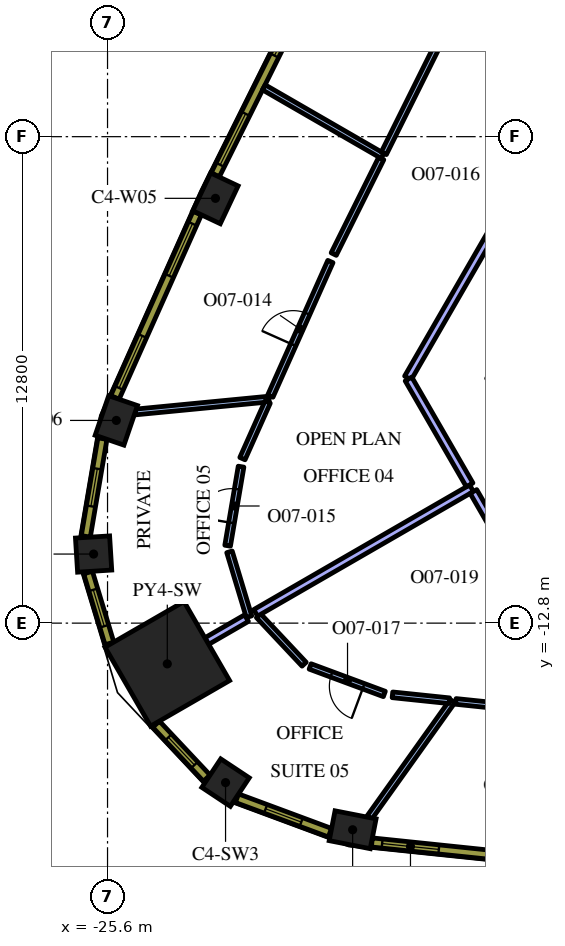
"""IFC4 building model, lengths in metres.
Left out: names, types, materials, properties, quantities, classifications, styles, units other than length and angle.
Written with IfcOpenShell. Run it as: python <this file> out.ifc"""

import sys

from ifc_helpers import new_model, si_unit, direction, frame, frame_2d, origin, origin_2d, place, context, subcontext, project, spatial, rectangle, extrude, element, fill, save


model = new_model("IFC4")
c1 = context("Model", 3, precision=1e-05, world=origin(), true_north=direction((0.0, 1.0)))
c2 = subcontext(c1, "Body", "Model", "MODEL_VIEW")
j1 = project(units=[si_unit("LENGTHUNIT", "METRE"), si_unit("PLANEANGLEUNIT", "RADIAN")], contexts=[c1])
p1 = place(None, origin())
s1 = spatial("IfcSite", under=j1, at=p1, CompositionType="ELEMENT")
p2 = place(p1, origin())
s2 = spatial("IfcBuilding", under=s1, at=p2, CompositionType="ELEMENT")
p3 = place(p2, frame((0.0, 0.0, 214.2)))
s3 = spatial("IfcBuildingStorey", under=s2, at=p3, CompositionType="ELEMENT", Elevation=214.2)
p4 = place(p3, frame((-24.027, -13.872, 0.0), z_axis=(0.0, 0.0, 1.0), x_axis=(-0.866025403784, -0.5, 0.0)))
e1 = element("IfcColumn", 1, at=p4, inside=s3, PredefinedType="COLUMN", context=c2, shape_type="SweptSolid", body=[
    extrude(rectangle(XDim=2.4, YDim=2.4, at=origin_2d()), origin(), (0.0, 0.0, 1.0), 4.2),
])
for number, where, z_axis, x_axis in (
    (2, (-19.15, -18.237, 0.0), (0.0, 0.0, 1.0), (0.981, -0.192, 0.0)),
    (3, (-22.76, -1.623, 0.0), (0.0, 0.0, 1.0), (-0.426, -0.905, 0.0)),
    (4, (-25.369, -7.466, 0.0), (0.0, 0.0, 1.0), (-0.324, -0.946, 0.0)),
):
    element("IfcColumn", number, at=place(p3, frame(where, z_axis=z_axis, x_axis=x_axis)), inside=s3, PredefinedType="COLUMN", context=c2, shape_type="SweptSolid", body=[
        extrude(rectangle(XDim=1.1, YDim=0.8, at=origin_2d()), origin(), (0.0, 0.0, 1.0), 4.2),
    ])
for number, where, z_axis, x_axis in (
    (5, (-25.967, -10.982, 0.0), (0.0, 0.0, 1.0), (0.062, -0.998, 0.0)),
    (6, (-22.494, -16.997, 0.0), (0.0, 0.0, 1.0), (0.833, -0.553, 0.0)),
):
    element("IfcColumn", number, at=place(p3, frame(where, z_axis=z_axis, x_axis=x_axis)), inside=s3, PredefinedType="COLUMN", context=c2, shape_type="SweptSolid", body=[
        extrude(rectangle(XDim=0.9, YDim=0.9, at=origin_2d()), origin(), (0.0, 0.0, 1.0), 4.2),
    ])
p5 = place(p3, frame((-18.363, -0.506, 0.0), z_axis=(0.0, 0.0, 1.0), x_axis=(-0.866048087663, 0.499960708312, 0.0)))
e7 = element("IfcWall", 7, at=p5, inside=s3, PredefinedType="PARTITIONING", context=c2, shape_type="SweptSolid", body=[
    extrude(rectangle(XDim=3.607, YDim=0.15, at=frame_2d((1.804, 0.0))), origin(), (0.0, 0.0, 1.0), 3.45),
])
p6 = place(p3, frame((-16.958, 2.321, 0.0), z_axis=(0.0, 0.0, 1.0), x_axis=(-0.445184199442, -0.895439014432, 0.0)))
e8 = element("IfcWall", 8, at=p6, inside=s3, PredefinedType="PARTITIONING", context=c2, shape_type="SweptSolid", body=[
    extrude(rectangle(XDim=3.082, YDim=0.15, at=frame_2d((1.541, 0.0))), origin(), (0.0, 0.0, 1.0), 3.45),
])
p7 = place(p3, frame((-21.351, -6.904, 0.0), z_axis=(0.0, 0.0, 1.0), x_axis=(-0.995356631468, -0.096255785242, 0.0)))
e9 = element("IfcWall", 9, at=p7, inside=s3, PredefinedType="PARTITIONING", context=c2, shape_type="SweptSolid", body=[
    extrude(rectangle(XDim=3.536, YDim=0.15, at=frame_2d((1.768, 0.0))), origin(), (0.0, 0.0, 1.0), 3.45),
])
p8 = place(p3, frame((-18.397, -0.573, 0.0), z_axis=(0.0, 0.0, 1.0), x_axis=(-0.445162501923, -0.89544980143, 0.0)))
e10 = element("IfcWall", 10, at=p8, inside=s3, PredefinedType="PARTITIONING", context=c2, shape_type="SweptSolid", body=[
    extrude(rectangle(XDim=2.811, YDim=0.15, at=frame_2d((1.405, 0.0))), origin(), (0.0, 0.0, 1.0), 3.45),
])
p9 = place(p3, frame((-21.316, -6.826, 0.0), z_axis=(0.0, 0.0, 1.0), x_axis=(0.407639588163, 0.913142905663, 0.0)))
e11 = element("IfcWall", 11, at=p9, inside=s3, PredefinedType="PARTITIONING", context=c2, shape_type="SweptSolid", body=[
    extrude(rectangle(XDim=3.877, YDim=0.15, at=frame_2d((1.938, 0.0))), origin(), (0.0, 0.0, 1.0), 3.45),
])
p10 = place(p9, frame((1.477, 0.0, 0.0)))
e12 = element("IfcOpeningElement", 12, at=p10, cuts=e11, PredefinedType="OPENING", context=c2, shape_type="SweptSolid", body=[
    extrude(rectangle(XDim=0.9, YDim=2.1, at=frame_2d((0.45, 1.05))), frame((0.0, 0.085, 0.0), z_axis=(0.0, -1.0, 0.0), x_axis=(1.0, 0.0, 0.0)), (0.0, 0.0, 1.0), 0.17),
])
p11 = place(p3, frame((-21.386, -6.983, 0.0), z_axis=(0.0, 0.0, 1.0), x_axis=(-0.407597309494, -0.91316177827, 0.0)))
e13 = element("IfcWall", 13, at=p11, inside=s3, PredefinedType="PARTITIONING", context=c2, shape_type="SweptSolid", body=[
    extrude(rectangle(XDim=1.63, YDim=0.15, at=frame_2d((0.815, 0.0))), origin(), (0.0, 0.0, 1.0), 3.45),
])
p12 = place(p3, frame((-22.44, -10.763, 0.0), z_axis=(0.0, 0.0, 1.0), x_axis=(0.167682096872, 0.985841120257, 0.0)))
e14 = element("IfcWall", 14, at=p12, inside=s3, PredefinedType="PARTITIONING", context=c2, shape_type="SweptSolid", body=[
    extrude(rectangle(XDim=2.11, YDim=0.15, at=frame_2d((1.055, 0.0))), origin(), (0.0, 0.0, 1.0), 3.45),
])
p13 = place(p12, frame((0.61, 0.0, 0.0)))
e15 = element("IfcOpeningElement", 15, at=p13, cuts=e14, PredefinedType="OPENING", context=c2, shape_type="SweptSolid", body=[
    extrude(rectangle(XDim=0.9, YDim=2.1, at=frame_2d((0.45, 1.05))), frame((0.0, 0.085, 0.0), z_axis=(0.0, -1.0, 0.0), x_axis=(1.0, 0.0, 0.0)), (0.0, 0.0, 1.0), 0.17),
])
p14 = place(p3, frame((-22.391, -10.924, 0.0), z_axis=(0.0, 0.0, 1.0), x_axis=(0.288642134652, -0.957437056993, 0.0)))
e16 = element("IfcWall", 16, at=p14, inside=s3, PredefinedType="PARTITIONING", context=c2, shape_type="SweptSolid", body=[
    extrude(rectangle(XDim=1.782, YDim=0.15, at=frame_2d((0.891, 0.0))), origin(), (0.0, 0.0, 1.0), 3.45),
])
p15 = place(p3, frame((-21.943, -12.669, 0.0), z_axis=(0.0, 0.0, 1.0), x_axis=(-0.866030586491, -0.499991023182, 0.0)))
e17 = element("IfcWall", 17, at=p15, inside=s3, PredefinedType="PARTITIONING", context=c2, shape_type="SweptSolid", body=[
    extrude(rectangle(XDim=1.207, YDim=0.2, at=frame_2d((0.603, 0.0))), origin(), (0.0, 0.0, 1.0), 3.45),
])
p16 = place(p3, frame((-16.021, -9.25, 0.0), z_axis=(0.0, 0.0, 1.0), x_axis=(-0.866021955858, -0.500005971936, 0.0)))
e18 = element("IfcWall", 18, at=p16, inside=s3, PredefinedType="PARTITIONING", context=c2, shape_type="SweptSolid", body=[
    extrude(rectangle(XDim=6.56, YDim=0.2, at=frame_2d((3.28, 0.0))), origin(), (0.0, 0.0, 1.0), 3.45),
])
p17 = place(p3, frame((-12.537, 2.585, 0.0), z_axis=(0.0, 0.0, 1.0), x_axis=(-0.500002393198, -0.866024022066, 0.0)))
e19 = element("IfcWall", 19, at=p17, inside=s3, PredefinedType="PARTITIONING", context=c2, shape_type="SweptSolid", body=[
    extrude(rectangle(XDim=10.317, YDim=0.2, at=frame_2d((5.159, 0.0))), origin(), (0.0, 0.0, 1.0), 3.45),
])
p18 = place(p17, frame((4.7, 0.0, 0.0)))
e20 = element("IfcOpeningElement", 20, at=p18, cuts=e19, PredefinedType="OPENING", context=c2, shape_type="SweptSolid", body=[
    extrude(rectangle(XDim=1.0, YDim=2.1, at=frame_2d((0.5, 1.05))), frame((0.0, 0.11, 0.0), z_axis=(0.0, -1.0, 0.0), x_axis=(1.0, 0.0, 0.0)), (0.0, 0.0, 1.0), 0.22),
])
p19 = place(p3, frame((-17.681, -6.376, 0.0), z_axis=(0.0, 0.0, 1.0), x_axis=(0.500022299258, -0.866012528919, 0.0)))
e21 = element("IfcWall", 21, at=p19, inside=s3, PredefinedType="PARTITIONING", context=c2, shape_type="SweptSolid", body=[
    extrude(rectangle(XDim=3.219, YDim=0.2, at=frame_2d((1.609, 0.0))), origin(), (0.0, 0.0, 1.0), 3.45),
])
p20 = place(p3, frame((-16.521, -14.851, 0.0), z_axis=(0.0, 0.0, 1.0), x_axis=(-0.58104805465, -0.813869251285, 0.0)))
e22 = element("IfcWall", 22, at=p20, inside=s3, PredefinedType="PARTITIONING", context=c2, shape_type="SweptSolid", body=[
    extrude(rectangle(XDim=3.766, YDim=0.15, at=frame_2d((1.883, 0.0))), origin(), (0.0, 0.0, 1.0), 3.45),
])
p21 = place(p3, frame((-21.628, -12.603, 0.0), z_axis=(0.0, 0.0, 1.0), x_axis=(0.684778496912, -0.728751267695, 0.0)))
e23 = element("IfcWall", 23, at=p21, inside=s3, PredefinedType="PARTITIONING", context=c2, shape_type="SweptSolid", body=[
    extrude(rectangle(XDim=1.754, YDim=0.15, at=frame_2d((0.877, 0.0))), origin(), (0.0, 0.0, 1.0), 3.45),
])
p22 = place(p3, frame((-18.316, -14.664, 0.0), z_axis=(0.0, 0.0, 1.0), x_axis=(-0.937594570401, 0.347730386297, 0.0)))
e24 = element("IfcWall", 24, at=p22, inside=s3, PredefinedType="PARTITIONING", context=c2, shape_type="SweptSolid", body=[
    extrude(rectangle(XDim=2.083, YDim=0.15, at=frame_2d((1.042, 0.0))), origin(), (0.0, 0.0, 1.0), 3.45),
])
p23 = place(p22, frame((0.583, 0.0, 0.0)))
e25 = element("IfcOpeningElement", 25, at=p23, cuts=e24, PredefinedType="OPENING", context=c2, shape_type="SweptSolid", body=[
    extrude(rectangle(XDim=0.9, YDim=2.1, at=frame_2d((0.45, 1.05))), frame((0.0, 0.085, 0.0), z_axis=(0.0, -1.0, 0.0), x_axis=(1.0, 0.0, 0.0)), (0.0, 0.0, 1.0), 0.17),
])
p24 = place(p3, frame((-18.103, -14.686, 0.0), z_axis=(0.0, 0.0, 1.0), x_axis=(0.994622241781, -0.103569281909, 0.0)))
e26 = element("IfcWall", 26, at=p24, inside=s3, PredefinedType="PARTITIONING", context=c2, shape_type="SweptSolid", body=[
    extrude(rectangle(XDim=1.504, YDim=0.15, at=frame_2d((0.752, 0.0))), origin(), (0.0, 0.0, 1.0), 3.45),
])
p25 = place(p3, frame((-12.823, -15.236, 0.0), z_axis=(0.0, 0.0, 1.0), x_axis=(-0.994621582944, 0.10357560882, 0.0)))
e27 = element("IfcWall", 27, at=p25, inside=s3, PredefinedType="PARTITIONING", context=c2, shape_type="SweptSolid", body=[
    extrude(rectangle(XDim=3.632, YDim=0.15, at=frame_2d((1.816, 0.0))), origin(), (0.0, 0.0, 1.0), 3.45),
])
p26 = place(p25, frame((1.332, 0.0, 0.0)))
e28 = element("IfcOpeningElement", 28, at=p26, cuts=e27, PredefinedType="OPENING", context=c2, shape_type="SweptSolid", body=[
    extrude(rectangle(XDim=0.9, YDim=2.1, at=frame_2d((0.45, 1.05))), frame((0.0, 0.085, 0.0), z_axis=(0.0, -1.0, 0.0), x_axis=(1.0, 0.0, 0.0)), (0.0, 0.0, 1.0), 0.17),
])
p27 = place(p3, frame((-15.971, -9.337, 0.0), z_axis=(0.0, 0.0, 1.0), x_axis=(0.500010870188, -0.866019127788, 0.0)))
e29 = element("IfcWall", 29, at=p27, inside=s3, PredefinedType="PARTITIONING", context=c2, shape_type="SweptSolid", body=[
    extrude(rectangle(XDim=3.249, YDim=0.2, at=frame_2d((1.624, 0.0))), origin(), (0.0, 0.0, 1.0), 3.45),
])
p28 = place(p27, frame((1.1, 0.0, 0.0)))
e30 = element("IfcOpeningElement", 30, at=p28, cuts=e29, PredefinedType="OPENING", context=c2, shape_type="SweptSolid", body=[
    extrude(rectangle(XDim=1.0, YDim=2.1, at=frame_2d((0.5, 1.05))), frame((0.0, 0.11, 0.0), z_axis=(0.0, -1.0, 0.0), x_axis=(1.0, 0.0, 0.0)), (0.0, 0.0, 1.0), 0.22),
])
p29 = place(p3, frame((-18.644, -18.571, 0.0), z_axis=(0.0, 0.0, 1.0), x_axis=(0.994621961215, -0.103571976272, 0.0)))
e31 = element("IfcWall", 31, at=p29, inside=s3, PredefinedType="SOLIDWALL", context=c2, shape_type="SweptSolid", body=[
    extrude(rectangle(XDim=5.311, YDim=0.24, at=frame_2d((2.655, 0.0))), origin(), (0.0, 0.0, 1.0), 3.95),
])
p30 = place(p29, frame((0.271, 0.0, 0.9)))
e32 = element("IfcOpeningElement", 32, at=p30, cuts=e31, PredefinedType="OPENING", context=c2, shape_type="SweptSolid", body=[
    extrude(rectangle(XDim=1.5, YDim=2.55, at=frame_2d((0.75, 1.275))), frame((0.0, 0.13, 0.0), z_axis=(0.0, -1.0, 0.0), x_axis=(1.0, 0.0, 0.0)), (0.0, 0.0, 1.0), 0.26),
])
p31 = place(p29, frame((3.504, 0.0, 0.9)))
e33 = element("IfcOpeningElement", 33, at=p31, cuts=e31, PredefinedType="OPENING", context=c2, shape_type="SweptSolid", body=[
    extrude(rectangle(XDim=1.5, YDim=2.55, at=frame_2d((0.75, 1.275))), frame((0.0, 0.13, 0.0), z_axis=(0.0, -1.0, 0.0), x_axis=(1.0, 0.0, 0.0)), (0.0, 0.0, 1.0), 0.26),
])
p32 = place(p3, frame((-20.407, 3.74, 0.0), z_axis=(0.0, 0.0, 1.0), x_axis=(-0.445129582031, -0.895466166419, 0.0)))
e34 = element("IfcWall", 34, at=p32, inside=s3, PredefinedType="SOLIDWALL", context=c2, shape_type="SweptSolid", body=[
    extrude(rectangle(XDim=5.298, YDim=0.24, at=frame_2d((2.649, 0.0))), origin(), (0.0, 0.0, 1.0), 3.95),
])
p33 = place(p32, frame((0.295, 0.0, 0.9)))
e35 = element("IfcOpeningElement", 35, at=p33, cuts=e34, PredefinedType="OPENING", context=c2, shape_type="SweptSolid", body=[
    extrude(rectangle(XDim=1.5, YDim=2.55, at=frame_2d((0.75, 1.275))), frame((0.0, 0.13, 0.0), z_axis=(0.0, -1.0, 0.0), x_axis=(1.0, 0.0, 0.0)), (0.0, 0.0, 1.0), 0.26),
])
p34 = place(p32, frame((3.504, 0.0, 0.9)))
e36 = element("IfcOpeningElement", 36, at=p34, cuts=e34, PredefinedType="OPENING", context=c2, shape_type="SweptSolid", body=[
    extrude(rectangle(XDim=1.5, YDim=2.55, at=frame_2d((0.75, 1.275))), frame((0.0, 0.13, 0.0), z_axis=(0.0, -1.0, 0.0), x_axis=(1.0, 0.0, 0.0)), (0.0, 0.0, 1.0), 0.26),
])
p35 = place(p3, frame((-23.24, -2.011, 0.0), z_axis=(0.0, 0.0, 1.0), x_axis=(-0.407579651789, -0.913169659728, 0.0)))
e37 = element("IfcWall", 37, at=p35, inside=s3, PredefinedType="SOLIDWALL", context=c2, shape_type="SweptSolid", body=[
    extrude(rectangle(XDim=5.311, YDim=0.24, at=frame_2d((2.655, 0.0))), origin(), (0.0, 0.0, 1.0), 3.95),
])
p36 = place(p35, frame((0.306, 0.0, 0.9)))
e38 = element("IfcOpeningElement", 38, at=p36, cuts=e37, PredefinedType="OPENING", context=c2, shape_type="SweptSolid", body=[
    extrude(rectangle(XDim=1.5, YDim=2.55, at=frame_2d((0.75, 1.275))), frame((0.0, 0.13, 0.0), z_axis=(0.0, -1.0, 0.0), x_axis=(1.0, 0.0, 0.0)), (0.0, 0.0, 1.0), 0.26),
])
p37 = place(p35, frame((3.539, 0.0, 0.9)))
e39 = element("IfcOpeningElement", 39, at=p37, cuts=e37, PredefinedType="OPENING", context=c2, shape_type="SweptSolid", body=[
    extrude(rectangle(XDim=1.5, YDim=2.55, at=frame_2d((0.75, 1.275))), frame((0.0, 0.13, 0.0), z_axis=(0.0, -1.0, 0.0), x_axis=(1.0, 0.0, 0.0)), (0.0, 0.0, 1.0), 0.26),
])
p38 = place(p3, frame((-25.734, -7.945, 0.0), z_axis=(0.0, 0.0, 1.0), x_axis=(-0.167660055546, -0.985844869021, 0.0)))
e40 = element("IfcWall", 40, at=p38, inside=s3, PredefinedType="SOLIDWALL", context=c2, shape_type="SweptSolid", body=[
    extrude(rectangle(XDim=2.609, YDim=0.24, at=frame_2d((1.305, 0.0))), origin(), (0.0, 0.0, 1.0), 3.95),
])
p39 = place(p38, frame((0.805, 0.0, 0.9)))
e41 = element("IfcOpeningElement", 41, at=p39, cuts=e40, PredefinedType="OPENING", context=c2, shape_type="SweptSolid", body=[
    extrude(rectangle(XDim=1.0, YDim=2.55, at=frame_2d((0.5, 1.275))), frame((0.0, 0.13, 0.0), z_axis=(0.0, -1.0, 0.0), x_axis=(1.0, 0.0, 0.0)), (0.0, 0.0, 1.0), 0.26),
])
p40 = place(p3, frame((-26.112, -11.469, 0.0), z_axis=(0.0, 0.0, 1.0), x_axis=(0.288727209095, -0.957411405159, 0.0)))
e42 = element("IfcWall", 42, at=p40, inside=s3, PredefinedType="SOLIDWALL", context=c2, shape_type="SweptSolid", body=[
    extrude(rectangle(XDim=1.948, YDim=0.24, at=frame_2d((0.974, 0.0))), origin(), (0.0, 0.0, 1.0), 3.95),
])
p41 = place(p40, frame((0.474, 0.0, 0.9)))
e43 = element("IfcOpeningElement", 43, at=p41, cuts=e42, PredefinedType="OPENING", context=c2, shape_type="SweptSolid", body=[
    extrude(rectangle(XDim=1.0, YDim=2.55, at=frame_2d((0.5, 1.275))), frame((0.0, 0.13, 0.0), z_axis=(0.0, -1.0, 0.0), x_axis=(1.0, 0.0, 0.0)), (0.0, 0.0, 1.0), 0.26),
])
p42 = place(p3, frame((-24.323, -15.459, 0.0), z_axis=(0.0, 0.0, 1.0), x_axis=(0.684770274166, -0.728758994194, 0.0)))
e44 = element("IfcWall", 44, at=p42, inside=s3, PredefinedType="SOLIDWALL", context=c2, shape_type="SweptSolid", body=[
    extrude(rectangle(XDim=1.948, YDim=0.24, at=frame_2d((0.974, 0.0))), origin(), (0.0, 0.0, 1.0), 3.95),
])
p43 = place(p42, frame((0.474, 0.0, 0.9)))
e45 = element("IfcOpeningElement", 45, at=p43, cuts=e44, PredefinedType="OPENING", context=c2, shape_type="SweptSolid", body=[
    extrude(rectangle(XDim=1.0, YDim=2.55, at=frame_2d((0.5, 1.275))), frame((0.0, 0.13, 0.0), z_axis=(0.0, -1.0, 0.0), x_axis=(1.0, 0.0, 0.0)), (0.0, 0.0, 1.0), 0.26),
])
p44 = place(p3, frame((-22.194, -17.406, 0.0), z_axis=(0.0, 0.0, 1.0), x_axis=(0.937569171184, -0.347798863203, 0.0)))
e46 = element("IfcWall", 46, at=p44, inside=s3, PredefinedType="SOLIDWALL", context=c2, shape_type="SweptSolid", body=[
    extrude(rectangle(XDim=2.609, YDim=0.24, at=frame_2d((1.305, 0.0))), origin(), (0.0, 0.0, 1.0), 3.95),
])
p45 = place(p44, frame((0.805, 0.0, 0.9)))
e47 = element("IfcOpeningElement", 47, at=p45, cuts=e46, PredefinedType="OPENING", context=c2, shape_type="SweptSolid", body=[
    extrude(rectangle(XDim=1.0, YDim=2.55, at=frame_2d((0.5, 1.275))), frame((0.0, 0.13, 0.0), z_axis=(0.0, -1.0, 0.0), x_axis=(1.0, 0.0, 0.0)), (0.0, 0.0, 1.0), 0.26),
])
p46 = place(p10, origin())
e48 = element("IfcDoor", 48, at=p46, inside=s3, OperationType="SINGLE_SWING_LEFT", PredefinedType="DOOR", context=c2, shape_type="SweptSolid", body=[
    extrude(rectangle(XDim=0.9, YDim=2.1, at=frame_2d((0.45, 1.05))), frame((0.0, 0.025, 0.0), z_axis=(0.0, -1.0, 0.0), x_axis=(1.0, 0.0, 0.0)), (0.0, 0.0, 1.0), 0.05),
])
fill(e12, e48)
p47 = place(p13, origin())
e49 = element("IfcDoor", 49, at=p47, inside=s3, OperationType="SINGLE_SWING_RIGHT", PredefinedType="DOOR", context=c2, shape_type="SweptSolid", body=[
    extrude(rectangle(XDim=0.9, YDim=2.1, at=frame_2d((0.45, 1.05))), frame((0.0, 0.025, 0.0), z_axis=(0.0, -1.0, 0.0), x_axis=(1.0, 0.0, 0.0)), (0.0, 0.0, 1.0), 0.05),
])
fill(e15, e49)
p48 = place(p23, origin())
e50 = element("IfcDoor", 50, at=p48, inside=s3, OperationType="SINGLE_SWING_LEFT", PredefinedType="DOOR", context=c2, shape_type="SweptSolid", body=[
    extrude(rectangle(XDim=0.9, YDim=2.1, at=frame_2d((0.45, 1.05))), frame((0.0, 0.025, 0.0), z_axis=(0.0, -1.0, 0.0), x_axis=(1.0, 0.0, 0.0)), (0.0, 0.0, 1.0), 0.05),
])
fill(e25, e50)
p49 = place(p30, origin())
e51 = element("IfcWindow", 51, at=p49, inside=s3, PartitioningType="SINGLE_PANEL", PredefinedType="WINDOW", context=c2, shape_type="SweptSolid", body=[
    extrude(rectangle(XDim=1.5, YDim=2.55, at=frame_2d((0.75, 1.275))), frame((0.0, 0.04, 0.0), z_axis=(0.0, -1.0, 0.0), x_axis=(1.0, 0.0, 0.0)), (0.0, 0.0, 1.0), 0.06),
])
fill(e32, e51)
p50 = place(p33, origin())
e52 = element("IfcWindow", 52, at=p50, inside=s3, PartitioningType="SINGLE_PANEL", PredefinedType="WINDOW", context=c2, shape_type="SweptSolid", body=[
    extrude(rectangle(XDim=1.5, YDim=2.55, at=frame_2d((0.75, 1.275))), frame((0.0, 0.04, 0.0), z_axis=(0.0, -1.0, 0.0), x_axis=(1.0, 0.0, 0.0)), (0.0, 0.0, 1.0), 0.06),
])
fill(e35, e52)
p51 = place(p34, origin())
e53 = element("IfcWindow", 53, at=p51, inside=s3, PartitioningType="SINGLE_PANEL", PredefinedType="WINDOW", context=c2, shape_type="SweptSolid", body=[
    extrude(rectangle(XDim=1.5, YDim=2.55, at=frame_2d((0.75, 1.275))), frame((0.0, 0.04, 0.0), z_axis=(0.0, -1.0, 0.0), x_axis=(1.0, 0.0, 0.0)), (0.0, 0.0, 1.0), 0.06),
])
fill(e36, e53)
p52 = place(p36, origin())
e54 = element("IfcWindow", 54, at=p52, inside=s3, PartitioningType="SINGLE_PANEL", PredefinedType="WINDOW", context=c2, shape_type="SweptSolid", body=[
    extrude(rectangle(XDim=1.5, YDim=2.55, at=frame_2d((0.75, 1.275))), frame((0.0, 0.04, 0.0), z_axis=(0.0, -1.0, 0.0), x_axis=(1.0, 0.0, 0.0)), (0.0, 0.0, 1.0), 0.06),
])
fill(e38, e54)
p53 = place(p37, origin())
e55 = element("IfcWindow", 55, at=p53, inside=s3, PartitioningType="SINGLE_PANEL", PredefinedType="WINDOW", context=c2, shape_type="SweptSolid", body=[
    extrude(rectangle(XDim=1.5, YDim=2.55, at=frame_2d((0.75, 1.275))), frame((0.0, 0.04, 0.0), z_axis=(0.0, -1.0, 0.0), x_axis=(1.0, 0.0, 0.0)), (0.0, 0.0, 1.0), 0.06),
])
fill(e39, e55)
p54 = place(p39, origin())
e56 = element("IfcWindow", 56, at=p54, inside=s3, PartitioningType="SINGLE_PANEL", PredefinedType="WINDOW", context=c2, shape_type="SweptSolid", body=[
    extrude(rectangle(XDim=1.0, YDim=2.55, at=frame_2d((0.5, 1.275))), frame((0.0, 0.04, 0.0), z_axis=(0.0, -1.0, 0.0), x_axis=(1.0, 0.0, 0.0)), (0.0, 0.0, 1.0), 0.06),
])
fill(e41, e56)
p55 = place(p41, origin())
e57 = element("IfcWindow", 57, at=p55, inside=s3, PartitioningType="SINGLE_PANEL", PredefinedType="WINDOW", context=c2, shape_type="SweptSolid", body=[
    extrude(rectangle(XDim=1.0, YDim=2.55, at=frame_2d((0.5, 1.275))), frame((0.0, 0.04, 0.0), z_axis=(0.0, -1.0, 0.0), x_axis=(1.0, 0.0, 0.0)), (0.0, 0.0, 1.0), 0.06),
])
fill(e43, e57)
p56 = place(p43, origin())
e58 = element("IfcWindow", 58, at=p56, inside=s3, PartitioningType="SINGLE_PANEL", PredefinedType="WINDOW", context=c2, shape_type="SweptSolid", body=[
    extrude(rectangle(XDim=1.0, YDim=2.55, at=frame_2d((0.5, 1.275))), frame((0.0, 0.04, 0.0), z_axis=(0.0, -1.0, 0.0), x_axis=(1.0, 0.0, 0.0)), (0.0, 0.0, 1.0), 0.06),
])
fill(e45, e58)
p57 = place(p45, origin())
e59 = element("IfcWindow", 59, at=p57, inside=s3, PartitioningType="SINGLE_PANEL", PredefinedType="WINDOW", context=c2, shape_type="SweptSolid", body=[
    extrude(rectangle(XDim=1.0, YDim=2.55, at=frame_2d((0.5, 1.275))), frame((0.0, 0.04, 0.0), z_axis=(0.0, -1.0, 0.0), x_axis=(1.0, 0.0, 0.0)), (0.0, 0.0, 1.0), 0.06),
])
fill(e47, e59)
save(model, sys.argv[1])
